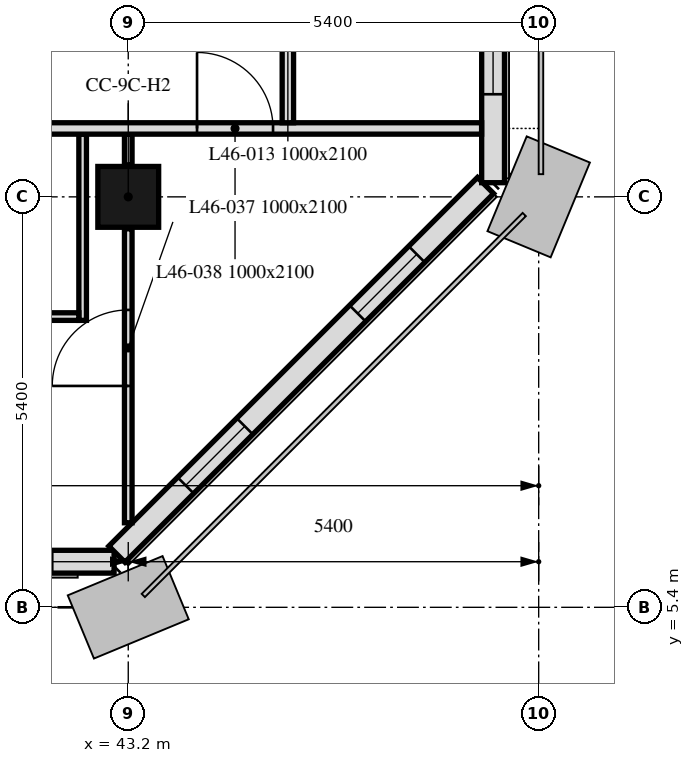
"""IFC4 building model, lengths in metres.
Left out: names, types, materials, properties, quantities, classifications, styles, units other than length and angle.
Written with IfcOpenShell. Run it as: python <this file> out.ifc"""

import sys

from ifc_helpers import new_model, si_unit, direction, frame, frame_2d, origin, origin_2d, place, context, subcontext, project, spatial, rectangle, extrude, element, fill, save


model = new_model("IFC4")
c1 = context("Model", 3, precision=1e-05, world=origin(), true_north=direction((0.0, 1.0)))
c2 = subcontext(c1, "Body", "Model", "MODEL_VIEW")
j1 = project(units=[si_unit("LENGTHUNIT", "METRE"), si_unit("PLANEANGLEUNIT", "RADIAN")], contexts=[c1])
p1 = place(None, origin())
s1 = spatial("IfcSite", under=j1, at=p1, CompositionType="ELEMENT")
p2 = place(p1, origin())
s2 = spatial("IfcBuilding", under=s1, at=p2, CompositionType="ELEMENT")
p3 = place(p2, frame((0.0, 0.0, 190.6)))
s3 = spatial("IfcBuildingStorey", under=s2, at=p3, CompositionType="ELEMENT", Elevation=190.6)
p4 = place(p3, frame((43.2, 10.8, 0.0), z_axis=(0.0, 0.0, 1.0), x_axis=(1.0, 0.0, 0.0)))
e1 = element("IfcColumn", 1, at=p4, inside=s3, PredefinedType="COLUMN", context=c2, shape_type="SweptSolid", body=[
    extrude(rectangle(XDim=0.8, YDim=0.8, at=origin_2d()), origin(), (0.0, 0.0, 1.0), 3.0),
])
p5 = place(p3, frame((10.986, 6.0, 0.0), z_axis=(0.0, 0.0, 1.0), x_axis=(1.0, 0.0, 0.0)))
e2 = element("IfcWall", 2, at=p5, inside=s3, PredefinedType="SOLIDWALL", context=c2, shape_type="SweptSolid", body=[
    extrude(rectangle(XDim=32.027, YDim=0.3, at=frame_2d((16.014, 0.0))), origin(), (0.0, 0.0, 1.0), 3.0),
])
p6 = place(p5, frame((2.764, 0.0, 0.9)))
e3 = element("IfcOpeningElement", 3, at=p6, cuts=e2, PredefinedType="OPENING", context=c2, shape_type="SweptSolid", body=[
    extrude(rectangle(XDim=1.1, YDim=1.7, at=frame_2d((0.55, 0.85))), frame((0.0, 0.16, 0.0), z_axis=(0.0, -1.0, 0.0), x_axis=(1.0, 0.0, 0.0)), (0.0, 0.0, 1.0), 0.32),
])
p7 = place(p5, frame((6.214, 0.0, 0.9)))
e4 = element("IfcOpeningElement", 4, at=p7, cuts=e2, PredefinedType="OPENING", context=c2, shape_type="SweptSolid", body=[
    extrude(rectangle(XDim=3.4, YDim=1.7, at=frame_2d((1.7, 0.85))), frame((0.0, 0.16, 0.0), z_axis=(0.0, -1.0, 0.0), x_axis=(1.0, 0.0, 0.0)), (0.0, 0.0, 1.0), 0.32),
])
p8 = place(p5, frame((13.564, 0.0, 0.9)))
e5 = element("IfcOpeningElement", 5, at=p8, cuts=e2, PredefinedType="OPENING", context=c2, shape_type="SweptSolid", body=[
    extrude(rectangle(XDim=1.1, YDim=1.7, at=frame_2d((0.55, 0.85))), frame((0.0, 0.16, 0.0), z_axis=(0.0, -1.0, 0.0), x_axis=(1.0, 0.0, 0.0)), (0.0, 0.0, 1.0), 0.32),
])
p9 = place(p5, frame((17.014, 0.0, 0.9)))
e6 = element("IfcOpeningElement", 6, at=p9, cuts=e2, PredefinedType="OPENING", context=c2, shape_type="SweptSolid", body=[
    extrude(rectangle(XDim=3.4, YDim=1.7, at=frame_2d((1.7, 0.85))), frame((0.0, 0.16, 0.0), z_axis=(0.0, -1.0, 0.0), x_axis=(1.0, 0.0, 0.0)), (0.0, 0.0, 1.0), 0.32),
])
p10 = place(p5, frame((24.364, 0.0, 0.9)))
e7 = element("IfcOpeningElement", 7, at=p10, cuts=e2, PredefinedType="OPENING", context=c2, shape_type="SweptSolid", body=[
    extrude(rectangle(XDim=1.1, YDim=1.7, at=frame_2d((0.55, 0.85))), frame((0.0, 0.16, 0.0), z_axis=(0.0, -1.0, 0.0), x_axis=(1.0, 0.0, 0.0)), (0.0, 0.0, 1.0), 0.32),
])
p11 = place(p5, frame((27.814, 0.0, 0.9)))
e8 = element("IfcOpeningElement", 8, at=p11, cuts=e2, PredefinedType="OPENING", context=c2, shape_type="SweptSolid", body=[
    extrude(rectangle(XDim=3.4, YDim=1.7, at=frame_2d((1.7, 0.85))), frame((0.0, 0.16, 0.0), z_axis=(0.0, -1.0, 0.0), x_axis=(1.0, 0.0, 0.0)), (0.0, 0.0, 1.0), 0.32),
])
p12 = place(p3, frame((43.051, 6.099, 0.0), z_axis=(0.0, 0.0, 1.0), x_axis=(0.707106781187, 0.707106781187, 0.0)))
e9 = element("IfcWall", 9, at=p12, inside=s3, PredefinedType="SOLIDWALL", context=c2, shape_type="SweptSolid", body=[
    extrude(rectangle(XDim=6.86, YDim=0.3, at=frame_2d((3.43, 0.0))), origin(), (0.0, 0.0, 1.0), 3.0),
])
p13 = place(p12, frame((1.28, 0.0, 0.9)))
e10 = element("IfcOpeningElement", 10, at=p13, cuts=e9, PredefinedType="OPENING", context=c2, shape_type="SweptSolid", body=[
    extrude(rectangle(XDim=1.1, YDim=1.7, at=frame_2d((0.55, 0.85))), frame((0.0, 0.16, 0.0), z_axis=(0.0, -1.0, 0.0), x_axis=(1.0, 0.0, 0.0)), (0.0, 0.0, 1.0), 0.32),
])
p14 = place(p12, frame((4.48, 0.0, 0.9)))
e11 = element("IfcOpeningElement", 11, at=p14, cuts=e9, PredefinedType="OPENING", context=c2, shape_type="SweptSolid", body=[
    extrude(rectangle(XDim=1.1, YDim=1.7, at=frame_2d((0.55, 0.85))), frame((0.0, 0.16, 0.0), z_axis=(0.0, -1.0, 0.0), x_axis=(1.0, 0.0, 0.0)), (0.0, 0.0, 1.0), 0.32),
])
p15 = place(p3, frame((48.0, 10.986, 0.0), z_axis=(0.0, 0.0, 1.0), x_axis=(0.0, 1.0, 0.0)))
e12 = element("IfcWall", 12, at=p15, inside=s3, PredefinedType="SOLIDWALL", context=c2, shape_type="SweptSolid", body=[
    extrude(rectangle(XDim=32.027, YDim=0.3, at=frame_2d((16.014, 0.0))), origin(), (0.0, 0.0, 1.0), 3.0),
])
p16 = place(p15, frame((1.164, 0.0, 0.9)))
e13 = element("IfcOpeningElement", 13, at=p16, cuts=e12, PredefinedType="OPENING", context=c2, shape_type="SweptSolid", body=[
    extrude(rectangle(XDim=1.1, YDim=1.7, at=frame_2d((0.55, 0.85))), frame((0.0, 0.16, 0.0), z_axis=(0.0, -1.0, 0.0), x_axis=(1.0, 0.0, 0.0)), (0.0, 0.0, 1.0), 0.32),
])
p17 = place(p15, frame((2.764, 0.0, 0.9)))
e14 = element("IfcOpeningElement", 14, at=p17, cuts=e12, PredefinedType="OPENING", context=c2, shape_type="SweptSolid", body=[
    extrude(rectangle(XDim=1.1, YDim=1.7, at=frame_2d((0.55, 0.85))), frame((0.0, 0.16, 0.0), z_axis=(0.0, -1.0, 0.0), x_axis=(1.0, 0.0, 0.0)), (0.0, 0.0, 1.0), 0.32),
])
p18 = place(p15, frame((6.214, 0.0, 0.9)))
e15 = element("IfcOpeningElement", 15, at=p18, cuts=e12, PredefinedType="OPENING", context=c2, shape_type="SweptSolid", body=[
    extrude(rectangle(XDim=3.4, YDim=1.7, at=frame_2d((1.7, 0.85))), frame((0.0, 0.16, 0.0), z_axis=(0.0, -1.0, 0.0), x_axis=(1.0, 0.0, 0.0)), (0.0, 0.0, 1.0), 0.32),
])
p19 = place(p15, frame((11.964, 0.0, 0.9)))
e16 = element("IfcOpeningElement", 16, at=p19, cuts=e12, PredefinedType="OPENING", context=c2, shape_type="SweptSolid", body=[
    extrude(rectangle(XDim=1.1, YDim=1.7, at=frame_2d((0.55, 0.85))), frame((0.0, 0.16, 0.0), z_axis=(0.0, -1.0, 0.0), x_axis=(1.0, 0.0, 0.0)), (0.0, 0.0, 1.0), 0.32),
])
p20 = place(p15, frame((13.564, 0.0, 0.9)))
e17 = element("IfcOpeningElement", 17, at=p20, cuts=e12, PredefinedType="OPENING", context=c2, shape_type="SweptSolid", body=[
    extrude(rectangle(XDim=1.1, YDim=1.7, at=frame_2d((0.55, 0.85))), frame((0.0, 0.16, 0.0), z_axis=(0.0, -1.0, 0.0), x_axis=(1.0, 0.0, 0.0)), (0.0, 0.0, 1.0), 0.32),
])
p21 = place(p15, frame((17.014, 0.0, 0.9)))
e18 = element("IfcOpeningElement", 18, at=p21, cuts=e12, PredefinedType="OPENING", context=c2, shape_type="SweptSolid", body=[
    extrude(rectangle(XDim=3.4, YDim=1.7, at=frame_2d((1.7, 0.85))), frame((0.0, 0.16, 0.0), z_axis=(0.0, -1.0, 0.0), x_axis=(1.0, 0.0, 0.0)), (0.0, 0.0, 1.0), 0.32),
])
p22 = place(p15, frame((22.764, 0.0, 0.9)))
e19 = element("IfcOpeningElement", 19, at=p22, cuts=e12, PredefinedType="OPENING", context=c2, shape_type="SweptSolid", body=[
    extrude(rectangle(XDim=1.1, YDim=1.7, at=frame_2d((0.55, 0.85))), frame((0.0, 0.16, 0.0), z_axis=(0.0, -1.0, 0.0), x_axis=(1.0, 0.0, 0.0)), (0.0, 0.0, 1.0), 0.32),
])
p23 = place(p15, frame((24.364, 0.0, 0.9)))
e20 = element("IfcOpeningElement", 20, at=p23, cuts=e12, PredefinedType="OPENING", context=c2, shape_type="SweptSolid", body=[
    extrude(rectangle(XDim=1.1, YDim=1.7, at=frame_2d((0.55, 0.85))), frame((0.0, 0.16, 0.0), z_axis=(0.0, -1.0, 0.0), x_axis=(1.0, 0.0, 0.0)), (0.0, 0.0, 1.0), 0.32),
])
p24 = place(p15, frame((28.164, 0.0, 0.9)))
e21 = element("IfcOpeningElement", 21, at=p24, cuts=e12, PredefinedType="OPENING", context=c2, shape_type="SweptSolid", body=[
    extrude(rectangle(XDim=1.1, YDim=1.7, at=frame_2d((0.55, 0.85))), frame((0.0, 0.16, 0.0), z_axis=(0.0, -1.0, 0.0), x_axis=(1.0, 0.0, 0.0)), (0.0, 0.0, 1.0), 0.32),
])
p25 = place(p15, frame((29.589, 0.0, 0.9)))
e22 = element("IfcOpeningElement", 22, at=p25, cuts=e12, PredefinedType="OPENING", context=c2, shape_type="SweptSolid", body=[
    extrude(rectangle(XDim=0.65, YDim=1.7, at=frame_2d((0.325, 0.85))), frame((0.0, 0.16, 0.0), z_axis=(0.0, -1.0, 0.0), x_axis=(1.0, 0.0, 0.0)), (0.0, 0.0, 1.0), 0.32),
])
p26 = place(p3, frame((43.2, 6.512, 0.0), z_axis=(0.0, 0.0, 1.0), x_axis=(0.0, 1.0, 0.0)))
e23 = element("IfcWall", 23, at=p26, inside=s3, PredefinedType="PARTITIONING", context=c2, shape_type="SweptSolid", body=[
    extrude(rectangle(XDim=3.868, YDim=0.1, at=frame_2d((1.934, 0.0))), origin(), (0.0, 0.0, 1.0), 3.0),
])
p27 = place(p26, frame((1.8, 0.0, 0.0)))
e24 = element("IfcOpeningElement", 24, at=p27, cuts=e23, PredefinedType="OPENING", context=c2, shape_type="SweptSolid", body=[
    extrude(rectangle(XDim=1.0, YDim=2.1, at=frame_2d((0.5, 1.05))), frame((0.0, 0.05, 0.0), z_axis=(0.0, -1.0, 0.0), x_axis=(1.0, 0.0, 0.0)), (0.0, 0.0, 1.0), 0.1),
])
p28 = place(p3, frame((43.2, 11.22, 0.0), z_axis=(0.0, 0.0, 1.0), x_axis=(0.0, 1.0, 0.0)))
e25 = element("IfcWall", 25, at=p28, inside=s3, PredefinedType="PARTITIONING", context=c2, shape_type="SweptSolid", body=[
    extrude(rectangle(XDim=0.405, YDim=0.1, at=frame_2d((0.203, 0.0))), origin(), (0.0, 0.0, 1.0), 3.0),
])
p29 = place(p3, frame((42.6, 11.625, 0.0), z_axis=(0.0, 0.0, 1.0), x_axis=(0.0, -1.0, 0.0)))
e26 = element("IfcWall", 26, at=p29, inside=s3, PredefinedType="PARTITIONING", context=c2, shape_type="SweptSolid", body=[
    extrude(rectangle(XDim=2.45, YDim=0.1, at=frame_2d((1.225, 0.0))), origin(), (0.0, 0.0, 1.0), 3.0),
])
p30 = place(p3, frame((42.55, 9.225, 0.0), z_axis=(0.0, 0.0, 1.0), x_axis=(-1.0, 0.0, 0.0)))
e27 = element("IfcWall", 27, at=p30, inside=s3, PredefinedType="PARTITIONING", context=c2, shape_type="SweptSolid", body=[
    extrude(rectangle(XDim=2.4, YDim=0.1, at=frame_2d((1.2, 0.0))), origin(), (0.0, 0.0, 1.0), 3.0),
])
p31 = place(p30, frame((1.1, 0.0, 0.0)))
e28 = element("IfcOpeningElement", 28, at=p31, cuts=e27, PredefinedType="OPENING", context=c2, shape_type="SweptSolid", body=[
    extrude(rectangle(XDim=0.9, YDim=2.1, at=frame_2d((0.45, 1.05))), frame((0.0, 0.05, 0.0), z_axis=(0.0, -1.0, 0.0), x_axis=(1.0, 0.0, 0.0)), (0.0, 0.0, 1.0), 0.1),
])
p32 = place(p3, frame((6.151, 11.7, 0.0), z_axis=(0.0, 0.0, 1.0), x_axis=(1.0, 0.0, 0.0)))
e29 = element("IfcWall", 29, at=p32, inside=s3, PredefinedType="PARTITIONING", context=c2, shape_type="SweptSolid", body=[
    extrude(rectangle(XDim=41.698, YDim=0.15, at=frame_2d((20.849, 0.0))), origin(), (0.0, 0.0, 1.0), 3.0),
])
p33 = place(p32, frame((17.649, 0.0, 0.0)))
e30 = element("IfcOpeningElement", 30, at=p33, cuts=e29, PredefinedType="OPENING", context=c2, shape_type="SweptSolid", body=[
    extrude(rectangle(XDim=1.0, YDim=2.1, at=frame_2d((0.5, 1.05))), frame((0.0, 0.075, 0.0), z_axis=(0.0, -1.0, 0.0), x_axis=(1.0, 0.0, 0.0)), (0.0, 0.0, 1.0), 0.15),
])
p34 = place(p32, frame((1.449, 0.0, 0.0)))
e31 = element("IfcOpeningElement", 31, at=p34, cuts=e29, PredefinedType="OPENING", context=c2, shape_type="SweptSolid", body=[
    extrude(rectangle(XDim=1.0, YDim=2.1, at=frame_2d((0.5, 1.05))), frame((0.0, 0.075, 0.0), z_axis=(0.0, -1.0, 0.0), x_axis=(1.0, 0.0, 0.0)), (0.0, 0.0, 1.0), 0.15),
])
p35 = place(p32, frame((29.249, 0.0, 0.0)))
e32 = element("IfcOpeningElement", 32, at=p35, cuts=e29, PredefinedType="OPENING", context=c2, shape_type="SweptSolid", body=[
    extrude(rectangle(XDim=1.0, YDim=2.1, at=frame_2d((0.5, 1.05))), frame((0.0, 0.075, 0.0), z_axis=(0.0, -1.0, 0.0), x_axis=(1.0, 0.0, 0.0)), (0.0, 0.0, 1.0), 0.15),
])
p36 = place(p32, frame((37.954, 0.0, 0.0)))
e33 = element("IfcOpeningElement", 33, at=p36, cuts=e29, PredefinedType="OPENING", context=c2, shape_type="SweptSolid", body=[
    extrude(rectangle(XDim=1.0, YDim=2.1, at=frame_2d((0.5, 1.05))), frame((0.0, 0.075, 0.0), z_axis=(0.0, -1.0, 0.0), x_axis=(1.0, 0.0, 0.0)), (0.0, 0.0, 1.0), 0.15),
])
p37 = place(p3, frame((45.3, 41.325, 0.0), z_axis=(0.0, 0.0, 1.0), x_axis=(0.0, -1.0, 0.0)))
e34 = element("IfcWall", 34, at=p37, inside=s3, PredefinedType="PARTITIONING", context=c2, shape_type="SweptSolid", body=[
    extrude(rectangle(XDim=29.55, YDim=0.15, at=frame_2d((14.775, 0.0))), origin(), (0.0, 0.0, 1.0), 2.4),
])
p38 = place(p37, frame((5.467, 0.0, 0.0)))
e35 = element("IfcOpeningElement", 35, at=p38, cuts=e34, PredefinedType="OPENING", context=c2, shape_type="SweptSolid", body=[
    extrude(rectangle(XDim=1.0, YDim=2.1, at=frame_2d((0.5, 1.05))), frame((0.0, 0.075, 0.0), z_axis=(0.0, -1.0, 0.0), x_axis=(1.0, 0.0, 0.0)), (0.0, 0.0, 1.0), 0.15),
])
p39 = place(p37, frame((11.125, 0.0, 0.0)))
e36 = element("IfcOpeningElement", 36, at=p39, cuts=e34, PredefinedType="OPENING", context=c2, shape_type="SweptSolid", body=[
    extrude(rectangle(XDim=1.0, YDim=2.1, at=frame_2d((0.5, 1.05))), frame((0.0, 0.075, 0.0), z_axis=(0.0, -1.0, 0.0), x_axis=(1.0, 0.0, 0.0)), (0.0, 0.0, 1.0), 0.15),
])
p40 = place(p37, frame((26.875, 0.0, 0.0)))
e37 = element("IfcOpeningElement", 37, at=p40, cuts=e34, PredefinedType="OPENING", context=c2, shape_type="SweptSolid", body=[
    extrude(rectangle(XDim=1.0, YDim=2.1, at=frame_2d((0.5, 1.05))), frame((0.0, 0.075, 0.0), z_axis=(0.0, -1.0, 0.0), x_axis=(1.0, 0.0, 0.0)), (0.0, 0.0, 1.0), 0.15),
])
p41 = place(p37, frame((20.575, 0.0, 0.0)))
e38 = element("IfcOpeningElement", 38, at=p41, cuts=e34, PredefinedType="OPENING", context=c2, shape_type="SweptSolid", body=[
    extrude(rectangle(XDim=1.0, YDim=2.1, at=frame_2d((0.5, 1.05))), frame((0.0, 0.075, 0.0), z_axis=(0.0, -1.0, 0.0), x_axis=(1.0, 0.0, 0.0)), (0.0, 0.0, 1.0), 0.15),
])
p42 = place(p13, origin())
e39 = element("IfcWindow", 39, at=p42, inside=s3, PartitioningType="SINGLE_PANEL", PredefinedType="WINDOW", context=c2, shape_type="SweptSolid", body=[
    extrude(rectangle(XDim=1.1, YDim=1.7, at=frame_2d((0.55, 0.85))), frame((0.0, 0.03, 0.0), z_axis=(0.0, -1.0, 0.0), x_axis=(1.0, 0.0, 0.0)), (0.0, 0.0, 1.0), 0.06),
])
fill(e10, e39)
p43 = place(p14, origin())
e40 = element("IfcWindow", 40, at=p43, inside=s3, PartitioningType="SINGLE_PANEL", PredefinedType="WINDOW", context=c2, shape_type="SweptSolid", body=[
    extrude(rectangle(XDim=1.1, YDim=1.7, at=frame_2d((0.55, 0.85))), frame((0.0, 0.03, 0.0), z_axis=(0.0, -1.0, 0.0), x_axis=(1.0, 0.0, 0.0)), (0.0, 0.0, 1.0), 0.06),
])
fill(e11, e40)
p44 = place(p16, origin())
e41 = element("IfcWindow", 41, at=p44, inside=s3, PartitioningType="SINGLE_PANEL", PredefinedType="WINDOW", context=c2, shape_type="SweptSolid", body=[
    extrude(rectangle(XDim=1.1, YDim=1.7, at=frame_2d((0.55, 0.85))), frame((0.0, 0.03, 0.0), z_axis=(0.0, -1.0, 0.0), x_axis=(1.0, 0.0, 0.0)), (0.0, 0.0, 1.0), 0.06),
])
fill(e13, e41)
p45 = place(p27, origin())
e42 = element("IfcDoor", 42, at=p45, inside=s3, OperationType="SINGLE_SWING_RIGHT", PredefinedType="DOOR", context=c2, shape_type="SweptSolid", body=[
    extrude(rectangle(XDim=1.0, YDim=2.1, at=frame_2d((0.5, 1.05))), frame((0.0, 0.025, 0.0), z_axis=(0.0, -1.0, 0.0), x_axis=(1.0, 0.0, 0.0)), (0.0, 0.0, 1.0), 0.05),
])
fill(e24, e42)
p46 = place(p36, origin())
e43 = element("IfcDoor", 43, at=p46, inside=s3, OperationType="SINGLE_SWING_RIGHT", PredefinedType="DOOR", context=c2, shape_type="SweptSolid", body=[
    extrude(rectangle(XDim=1.0, YDim=2.1, at=frame_2d((0.5, 1.05))), frame((0.0, 0.025, 0.0), z_axis=(0.0, -1.0, 0.0), x_axis=(1.0, 0.0, 0.0)), (0.0, 0.0, 1.0), 0.05),
])
fill(e33, e43)
save(model, sys.argv[1])
